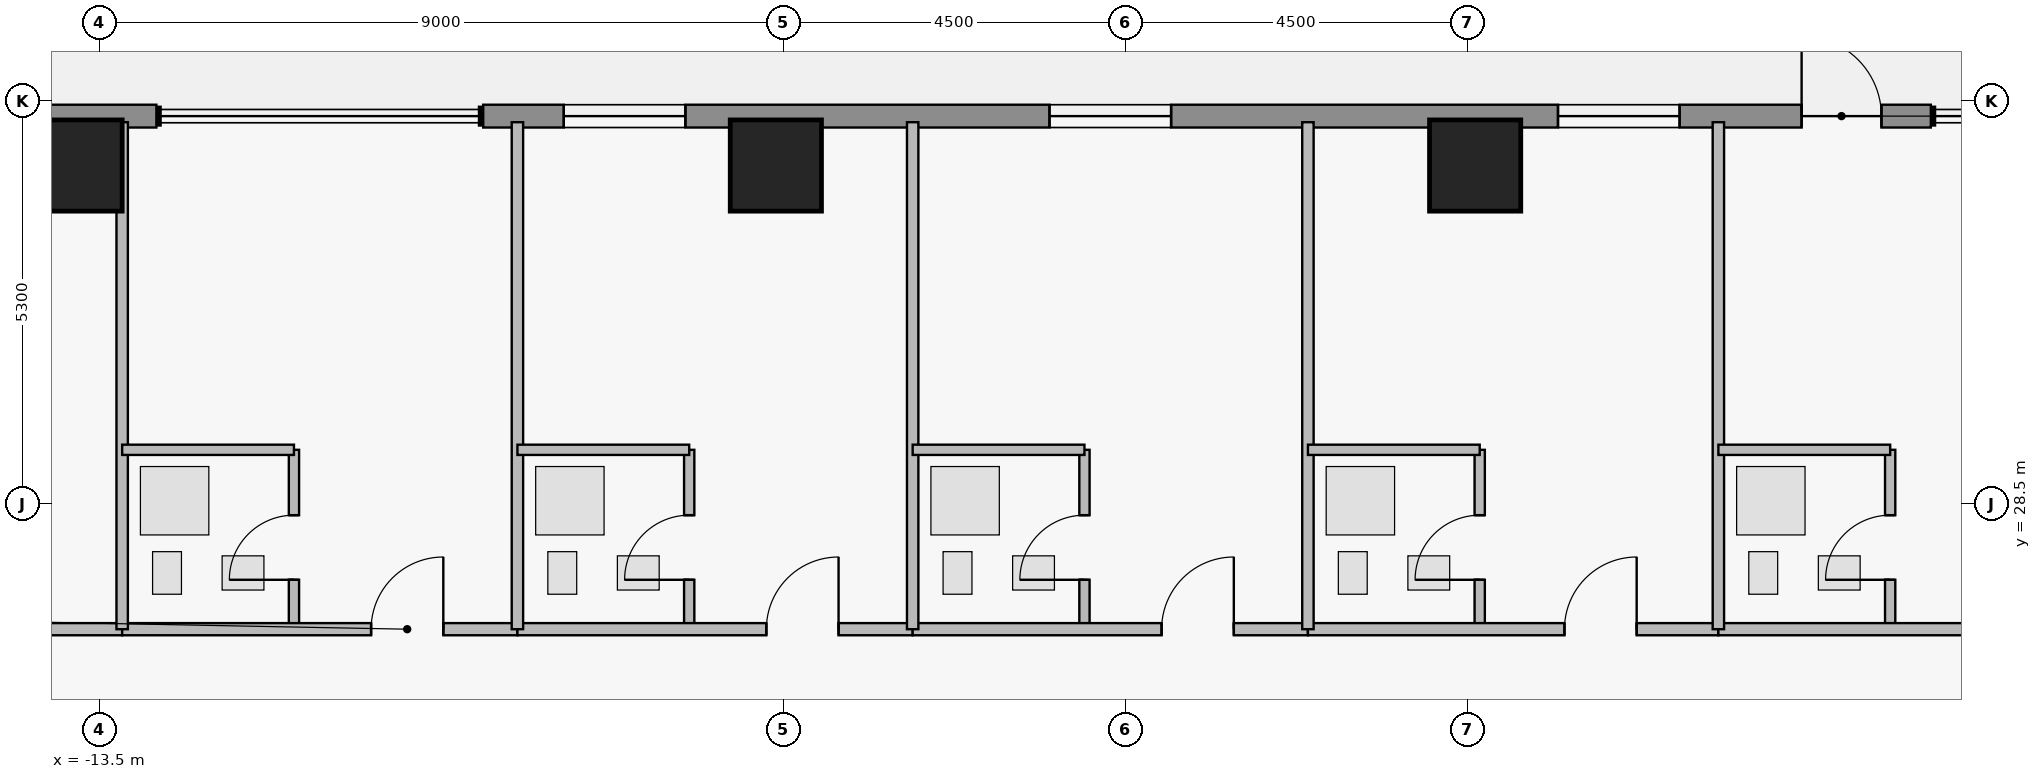
"""IFC4 building model, lengths in metres.
Left out: names, types, materials, properties, quantities, classifications, styles, units other than length and angle.
Written with IfcOpenShell. Run it as: python <this file> out.ifc"""

import sys

from ifc_helpers import new_model, si_unit, direction, frame, frame_2d, origin, origin_2d, place, context, subcontext, project, spatial, rectangle, extrude, element, fill, save


model = new_model("IFC4")
c1 = context("Model", 3, precision=1e-05, world=origin(), true_north=direction((0.0, 1.0)))
c2 = subcontext(c1, "Body", "Model", "MODEL_VIEW")
j1 = project(units=[si_unit("LENGTHUNIT", "METRE"), si_unit("PLANEANGLEUNIT", "RADIAN")], contexts=[c1])
p1 = place(None, origin())
s1 = spatial("IfcSite", under=j1, at=p1, CompositionType="ELEMENT")
p2 = place(p1, origin())
s2 = spatial("IfcBuilding", under=s1, at=p2, CompositionType="ELEMENT")
p3 = place(p2, frame((0.0, 0.0, 199.9)))
s3 = spatial("IfcBuildingStorey", under=s2, at=p3, CompositionType="ELEMENT", Elevation=199.9)
for number, where, z_axis, x_axis in (
    (1, (-13.8, 32.95, 0.0), (0.0, 0.0, 1.0), (1.0, 0.0, 0.0)),
    (2, (-4.6, 32.95, 0.0), (0.0, 0.0, 1.0), (1.0, 0.0, 0.0)),
    (3, (4.6, 32.95, 0.0), (0.0, 0.0, 1.0), (1.0, 0.0, 0.0)),
):
    element("IfcColumn", number, at=place(p3, frame(where, z_axis=z_axis, x_axis=x_axis)), inside=s3, PredefinedType="COLUMN", context=c2, shape_type="SweptSolid", body=[
        extrude(rectangle(XDim=1.2, YDim=1.2, at=origin_2d()), origin(), (0.0, 0.0, 1.0), 3.75),
    ])
p4 = place(p3, frame((-14.72, 33.6, 0.0), z_axis=(0.0, 0.0, 1.0), x_axis=(1.0, 0.0, 0.0)))
e4 = element("IfcWall", 4, at=p4, inside=s3, PredefinedType="STANDARD", context=c2, shape_type="SweptSolid", body=[
    extrude(rectangle(XDim=1.97, YDim=0.3, at=frame_2d((0.985, 0.0))), origin(), (0.0, 0.0, 1.0), 3.53),
])
p5 = place(p3, frame((-8.45, 33.6, 0.0), z_axis=(0.0, 0.0, 1.0), x_axis=(1.0, 0.0, 0.0)))
e5 = element("IfcWall", 5, at=p5, inside=s3, PredefinedType="STANDARD", context=c2, shape_type="SweptSolid", body=[
    extrude(rectangle(XDim=19.045, YDim=0.3, at=frame_2d((9.522, 0.0))), origin(), (0.0, 0.0, 1.0), 3.53),
])
p6 = place(p5, frame((17.345, 0.0, 0.0)))
e6 = element("IfcOpeningElement", 6, at=p6, cuts=e5, PredefinedType="OPENING", context=c2, shape_type="SweptSolid", body=[
    extrude(rectangle(XDim=1.05, YDim=2.2, at=frame_2d((0.525, 1.1))), frame((0.0, 0.16, 0.0), z_axis=(0.0, -1.0, 0.0), x_axis=(1.0, 0.0, 0.0)), (0.0, 0.0, 1.0), 0.32),
])
p7 = place(p5, frame((7.45, 0.0, 0.85)))
e7 = element("IfcOpeningElement", 7, at=p7, cuts=e5, PredefinedType="OPENING", context=c2, shape_type="SweptSolid", body=[
    extrude(rectangle(XDim=1.6, YDim=1.8, at=frame_2d((0.8, 0.9))), frame((0.0, 0.16, 0.0), z_axis=(0.0, -1.0, 0.0), x_axis=(1.0, 0.0, 0.0)), (0.0, 0.0, 1.0), 0.32),
])
p8 = place(p5, frame((1.06, 0.0, 0.85)))
e8 = element("IfcOpeningElement", 8, at=p8, cuts=e5, PredefinedType="OPENING", context=c2, shape_type="SweptSolid", body=[
    extrude(rectangle(XDim=1.6, YDim=1.8, at=frame_2d((0.8, 0.9))), frame((0.0, 0.16, 0.0), z_axis=(0.0, -1.0, 0.0), x_axis=(1.0, 0.0, 0.0)), (0.0, 0.0, 1.0), 0.32),
])
p9 = place(p5, frame((14.14, 0.0, 0.85)))
e9 = element("IfcOpeningElement", 9, at=p9, cuts=e5, PredefinedType="OPENING", context=c2, shape_type="SweptSolid", body=[
    extrude(rectangle(XDim=1.6, YDim=1.8, at=frame_2d((0.8, 0.9))), frame((0.0, 0.16, 0.0), z_axis=(0.0, -1.0, 0.0), x_axis=(1.0, 0.0, 0.0)), (0.0, 0.0, 1.0), 0.32),
])
p10 = place(p3, frame((-22.04, 26.85, 0.0), z_axis=(0.0, 0.0, 1.0), x_axis=(1.0, 0.0, 0.0)))
e10 = element("IfcWall", 10, at=p10, inside=s3, PredefinedType="PARTITIONING", context=c2, shape_type="SweptSolid", body=[
    extrude(rectangle(XDim=8.84, YDim=0.16, at=frame_2d((4.42, 0.0))), origin(), (0.0, 0.0, 1.0), 3.53),
])
p11 = place(p10, frame((5.07, 0.0, 0.0)))
e11 = element("IfcOpeningElement", 11, at=p11, cuts=e10, PredefinedType="OPENING", context=c2, shape_type="SweptSolid", body=[
    extrude(rectangle(XDim=1.0, YDim=2.15, at=frame_2d((0.5, 1.075))), frame((0.0, 0.09, 0.0), z_axis=(0.0, -1.0, 0.0), x_axis=(1.0, 0.0, 0.0)), (0.0, 0.0, 1.0), 0.18),
])
p12 = place(p3, frame((-10.94, 26.85, 0.0), z_axis=(0.0, 0.0, 1.0), x_axis=(0.0, 1.0, 0.0)))
e12 = element("IfcWall", 12, at=p12, inside=s3, PredefinedType="PLUMBINGWALL", context=c2, shape_type="SweptSolid", body=[
    extrude(rectangle(XDim=2.36, YDim=0.135, at=frame_2d((1.18, 0.0))), origin(), (0.0, 0.0, 1.0), 3.53),
])
p13 = place(p12, frame((0.65, 0.0, 0.0)))
e13 = element("IfcOpeningElement", 13, at=p13, cuts=e12, PredefinedType="OPENING", context=c2, shape_type="SweptSolid", body=[
    extrude(rectangle(XDim=0.85, YDim=2.1, at=frame_2d((0.425, 1.05))), frame((0.0, 0.077, 0.0), z_axis=(0.0, -1.0, 0.0), x_axis=(1.0, 0.0, 0.0)), (0.0, 0.0, 1.0), 0.155),
])
p14 = place(p3, frame((-13.2, 26.85, 0.0), z_axis=(0.0, 0.0, 1.0), x_axis=(1.0, 0.0, 0.0)))
e14 = element("IfcWall", 14, at=p14, inside=s3, PredefinedType="PARTITIONING", context=c2, shape_type="SweptSolid", body=[
    extrude(rectangle(XDim=5.2, YDim=0.16, at=frame_2d((2.6, 0.0))), origin(), (0.0, 0.0, 1.0), 3.53),
])
p15 = place(p14, frame((3.275, 0.0, 0.0)))
e15 = element("IfcOpeningElement", 15, at=p15, cuts=e14, PredefinedType="OPENING", context=c2, shape_type="SweptSolid", body=[
    extrude(rectangle(XDim=0.95, YDim=2.15, at=frame_2d((0.475, 1.075))), frame((0.0, 0.09, 0.0), z_axis=(0.0, -1.0, 0.0), x_axis=(1.0, 0.0, 0.0)), (0.0, 0.0, 1.0), 0.18),
])
p16 = place(p3, frame((-5.74, 26.85, 0.0), z_axis=(0.0, 0.0, 1.0), x_axis=(0.0, 1.0, 0.0)))
e16 = element("IfcWall", 16, at=p16, inside=s3, PredefinedType="PLUMBINGWALL", context=c2, shape_type="SweptSolid", body=[
    extrude(rectangle(XDim=2.36, YDim=0.135, at=frame_2d((1.18, 0.0))), origin(), (0.0, 0.0, 1.0), 3.53),
])
p17 = place(p16, frame((0.65, 0.0, 0.0)))
e17 = element("IfcOpeningElement", 17, at=p17, cuts=e16, PredefinedType="OPENING", context=c2, shape_type="SweptSolid", body=[
    extrude(rectangle(XDim=0.85, YDim=2.1, at=frame_2d((0.425, 1.05))), frame((0.0, 0.077, 0.0), z_axis=(0.0, -1.0, 0.0), x_axis=(1.0, 0.0, 0.0)), (0.0, 0.0, 1.0), 0.155),
])
p18 = place(p3, frame((-8.0, 26.85, 0.0), z_axis=(0.0, 0.0, 1.0), x_axis=(1.0, 0.0, 0.0)))
e18 = element("IfcWall", 18, at=p18, inside=s3, PredefinedType="PARTITIONING", context=c2, shape_type="SweptSolid", body=[
    extrude(rectangle(XDim=5.2, YDim=0.16, at=frame_2d((2.6, 0.0))), origin(), (0.0, 0.0, 1.0), 3.53),
])
p19 = place(p18, frame((3.275, 0.0, 0.0)))
e19 = element("IfcOpeningElement", 19, at=p19, cuts=e18, PredefinedType="OPENING", context=c2, shape_type="SweptSolid", body=[
    extrude(rectangle(XDim=0.95, YDim=2.15, at=frame_2d((0.475, 1.075))), frame((0.0, 0.09, 0.0), z_axis=(0.0, -1.0, 0.0), x_axis=(1.0, 0.0, 0.0)), (0.0, 0.0, 1.0), 0.18),
])
p20 = place(p3, frame((-0.54, 26.85, 0.0), z_axis=(0.0, 0.0, 1.0), x_axis=(0.0, 1.0, 0.0)))
e20 = element("IfcWall", 20, at=p20, inside=s3, PredefinedType="PLUMBINGWALL", context=c2, shape_type="SweptSolid", body=[
    extrude(rectangle(XDim=2.36, YDim=0.135, at=frame_2d((1.18, 0.0))), origin(), (0.0, 0.0, 1.0), 3.53),
])
p21 = place(p20, frame((0.65, 0.0, 0.0)))
e21 = element("IfcOpeningElement", 21, at=p21, cuts=e20, PredefinedType="OPENING", context=c2, shape_type="SweptSolid", body=[
    extrude(rectangle(XDim=0.85, YDim=2.1, at=frame_2d((0.425, 1.05))), frame((0.0, 0.077, 0.0), z_axis=(0.0, -1.0, 0.0), x_axis=(1.0, 0.0, 0.0)), (0.0, 0.0, 1.0), 0.155),
])
p22 = place(p3, frame((-2.8, 26.85, 0.0), z_axis=(0.0, 0.0, 1.0), x_axis=(1.0, 0.0, 0.0)))
e22 = element("IfcWall", 22, at=p22, inside=s3, PredefinedType="PARTITIONING", context=c2, shape_type="SweptSolid", body=[
    extrude(rectangle(XDim=5.2, YDim=0.16, at=frame_2d((2.6, 0.0))), origin(), (0.0, 0.0, 1.0), 3.53),
])
p23 = place(p22, frame((3.275, 0.0, 0.0)))
e23 = element("IfcOpeningElement", 23, at=p23, cuts=e22, PredefinedType="OPENING", context=c2, shape_type="SweptSolid", body=[
    extrude(rectangle(XDim=0.95, YDim=2.15, at=frame_2d((0.475, 1.075))), frame((0.0, 0.09, 0.0), z_axis=(0.0, -1.0, 0.0), x_axis=(1.0, 0.0, 0.0)), (0.0, 0.0, 1.0), 0.18),
])
p24 = place(p3, frame((4.66, 26.85, 0.0), z_axis=(0.0, 0.0, 1.0), x_axis=(0.0, 1.0, 0.0)))
e24 = element("IfcWall", 24, at=p24, inside=s3, PredefinedType="PLUMBINGWALL", context=c2, shape_type="SweptSolid", body=[
    extrude(rectangle(XDim=2.36, YDim=0.135, at=frame_2d((1.18, 0.0))), origin(), (0.0, 0.0, 1.0), 2.519),
])
p25 = place(p24, frame((0.65, 0.0, 0.0)))
e25 = element("IfcOpeningElement", 25, at=p25, cuts=e24, PredefinedType="OPENING", context=c2, shape_type="SweptSolid", body=[
    extrude(rectangle(XDim=0.85, YDim=2.1, at=frame_2d((0.425, 1.05))), frame((0.0, 0.077, 0.0), z_axis=(0.0, -1.0, 0.0), x_axis=(1.0, 0.0, 0.0)), (0.0, 0.0, 1.0), 0.155),
])
p26 = place(p3, frame((2.4, 26.85, 0.0), z_axis=(0.0, 0.0, 1.0), x_axis=(1.0, 0.0, 0.0)))
e26 = element("IfcWall", 26, at=p26, inside=s3, PredefinedType="PARTITIONING", context=c2, shape_type="SweptSolid", body=[
    extrude(rectangle(XDim=5.4, YDim=0.16, at=frame_2d((2.7, 0.0))), origin(), (0.0, 0.0, 1.0), 3.53),
])
p27 = place(p26, frame((3.375, 0.0, 0.0)))
e27 = element("IfcOpeningElement", 27, at=p27, cuts=e26, PredefinedType="OPENING", context=c2, shape_type="SweptSolid", body=[
    extrude(rectangle(XDim=0.95, YDim=2.15, at=frame_2d((0.475, 1.075))), frame((0.0, 0.09, 0.0), z_axis=(0.0, -1.0, 0.0), x_axis=(1.0, 0.0, 0.0)), (0.0, 0.0, 1.0), 0.18),
])
p28 = place(p3, frame((10.06, 26.85, 0.0), z_axis=(0.0, 0.0, 1.0), x_axis=(0.0, 1.0, 0.0)))
e28 = element("IfcWall", 28, at=p28, inside=s3, PredefinedType="PLUMBINGWALL", context=c2, shape_type="SweptSolid", body=[
    extrude(rectangle(XDim=2.36, YDim=0.135, at=frame_2d((1.18, 0.0))), origin(), (0.0, 0.0, 1.0), 3.53),
])
p29 = place(p28, frame((0.65, 0.0, 0.0)))
e29 = element("IfcOpeningElement", 29, at=p29, cuts=e28, PredefinedType="OPENING", context=c2, shape_type="SweptSolid", body=[
    extrude(rectangle(XDim=0.85, YDim=2.1, at=frame_2d((0.425, 1.05))), frame((0.0, 0.077, 0.0), z_axis=(0.0, -1.0, 0.0), x_axis=(1.0, 0.0, 0.0)), (0.0, 0.0, 1.0), 0.155),
])
p30 = place(p3, frame((7.8, 26.85, 0.0), z_axis=(0.0, 0.0, 1.0), x_axis=(1.0, 0.0, 0.0)))
e30 = element("IfcWall", 30, at=p30, inside=s3, PredefinedType="PARTITIONING", context=c2, shape_type="SweptSolid", body=[
    extrude(rectangle(XDim=5.4, YDim=0.16, at=frame_2d((2.7, 0.0))), origin(), (0.0, 0.0, 1.0), 3.53),
])
p31 = place(p30, frame((3.375, 0.0, 0.0)))
e31 = element("IfcOpeningElement", 31, at=p31, cuts=e30, PredefinedType="OPENING", context=c2, shape_type="SweptSolid", body=[
    extrude(rectangle(XDim=0.95, YDim=2.15, at=frame_2d((0.475, 1.075))), frame((0.0, 0.09, 0.0), z_axis=(0.0, -1.0, 0.0), x_axis=(1.0, 0.0, 0.0)), (0.0, 0.0, 1.0), 0.18),
])
p32 = place(p3, frame((-13.2, 26.85, 0.0), z_axis=(0.0, 0.0, 1.0), x_axis=(0.0, 1.0, 0.0)))
e32 = element("IfcWall", 32, at=p32, inside=s3, PredefinedType="PARTITIONING", context=c2, shape_type="SweptSolid", body=[
    extrude(rectangle(XDim=6.67, YDim=0.15, at=frame_2d((3.335, 0.0))), origin(), (0.0, 0.0, 1.0), 3.53),
])
p33 = place(p3, frame((-13.2, 29.21, 0.0), z_axis=(0.0, 0.0, 1.0), x_axis=(1.0, 0.0, 0.0)))
e33 = element("IfcWall", 33, at=p33, inside=s3, PredefinedType="PLUMBINGWALL", context=c2, shape_type="SweptSolid", body=[
    extrude(rectangle(XDim=2.26, YDim=0.135, at=frame_2d((1.13, 0.0))), origin(), (0.0, 0.0, 1.0), 3.53),
])
p34 = place(p3, frame((-8.0, 26.85, 0.0), z_axis=(0.0, 0.0, 1.0), x_axis=(0.0, 1.0, 0.0)))
e34 = element("IfcWall", 34, at=p34, inside=s3, PredefinedType="PARTITIONING", context=c2, shape_type="SweptSolid", body=[
    extrude(rectangle(XDim=6.67, YDim=0.15, at=frame_2d((3.335, 0.0))), origin(), (0.0, 0.0, 1.0), 3.53),
])
p35 = place(p3, frame((-8.0, 29.21, 0.0), z_axis=(0.0, 0.0, 1.0), x_axis=(1.0, 0.0, 0.0)))
e35 = element("IfcWall", 35, at=p35, inside=s3, PredefinedType="PLUMBINGWALL", context=c2, shape_type="SweptSolid", body=[
    extrude(rectangle(XDim=2.26, YDim=0.135, at=frame_2d((1.13, 0.0))), origin(), (0.0, 0.0, 1.0), 3.53),
])
p36 = place(p3, frame((-2.8, 26.85, 0.0), z_axis=(0.0, 0.0, 1.0), x_axis=(0.0, 1.0, 0.0)))
e36 = element("IfcWall", 36, at=p36, inside=s3, PredefinedType="PARTITIONING", context=c2, shape_type="SweptSolid", body=[
    extrude(rectangle(XDim=6.67, YDim=0.15, at=frame_2d((3.335, 0.0))), origin(), (0.0, 0.0, 1.0), 3.53),
])
p37 = place(p3, frame((-2.8, 29.21, 0.0), z_axis=(0.0, 0.0, 1.0), x_axis=(1.0, 0.0, 0.0)))
e37 = element("IfcWall", 37, at=p37, inside=s3, PredefinedType="PLUMBINGWALL", context=c2, shape_type="SweptSolid", body=[
    extrude(rectangle(XDim=2.26, YDim=0.135, at=frame_2d((1.13, 0.0))), origin(), (0.0, 0.0, 1.0), 3.53),
])
p38 = place(p3, frame((2.4, 26.85, 0.0), z_axis=(0.0, 0.0, 1.0), x_axis=(0.0, 1.0, 0.0)))
e38 = element("IfcWall", 38, at=p38, inside=s3, PredefinedType="PARTITIONING", context=c2, shape_type="SweptSolid", body=[
    extrude(rectangle(XDim=6.67, YDim=0.15, at=frame_2d((3.335, 0.0))), origin(), (0.0, 0.0, 1.0), 3.53),
])
p39 = place(p3, frame((2.4, 29.21, 0.0), z_axis=(0.0, 0.0, 1.0), x_axis=(1.0, 0.0, 0.0)))
e39 = element("IfcWall", 39, at=p39, inside=s3, PredefinedType="PLUMBINGWALL", context=c2, shape_type="SweptSolid", body=[
    extrude(rectangle(XDim=2.26, YDim=0.135, at=frame_2d((1.13, 0.0))), origin(), (0.0, 0.0, 1.0), 3.53),
])
p40 = place(p3, frame((7.8, 26.85, 0.0), z_axis=(0.0, 0.0, 1.0), x_axis=(0.0, 1.0, 0.0)))
e40 = element("IfcWall", 40, at=p40, inside=s3, PredefinedType="PARTITIONING", context=c2, shape_type="SweptSolid", body=[
    extrude(rectangle(XDim=6.67, YDim=0.15, at=frame_2d((3.335, 0.0))), origin(), (0.0, 0.0, 1.0), 3.53),
])
p41 = place(p3, frame((7.8, 29.21, 0.0), z_axis=(0.0, 0.0, 1.0), x_axis=(1.0, 0.0, 0.0)))
e41 = element("IfcWall", 41, at=p41, inside=s3, PredefinedType="PLUMBINGWALL", context=c2, shape_type="SweptSolid", body=[
    extrude(rectangle(XDim=2.26, YDim=0.135, at=frame_2d((1.13, 0.0))), origin(), (0.0, 0.0, 1.0), 3.53),
])
p42 = place(p6, origin())
e42 = element("IfcDoor", 42, at=p42, inside=s3, OperationType="SINGLE_SWING_LEFT", PredefinedType="DOOR", context=c2, shape_type="SweptSolid", body=[
    extrude(rectangle(XDim=1.05, YDim=2.2, at=frame_2d((0.525, 1.1))), frame((0.0, 0.025, 0.0), z_axis=(0.0, -1.0, 0.0), x_axis=(1.0, 0.0, 0.0)), (0.0, 0.0, 1.0), 0.05),
])
fill(e6, e42)
p43 = place(p7, origin())
e43 = element("IfcWindow", 43, at=p43, inside=s3, PartitioningType="SINGLE_PANEL", PredefinedType="WINDOW", context=c2, shape_type="SweptSolid", body=[
    extrude(rectangle(XDim=1.6, YDim=1.8, at=frame_2d((0.8, 0.9))), frame((0.0, 0.03, 0.0), z_axis=(0.0, -1.0, 0.0), x_axis=(1.0, 0.0, 0.0)), (0.0, 0.0, 1.0), 0.06),
])
fill(e7, e43)
p44 = place(p8, origin())
e44 = element("IfcWindow", 44, at=p44, inside=s3, PartitioningType="SINGLE_PANEL", PredefinedType="WINDOW", context=c2, shape_type="SweptSolid", body=[
    extrude(rectangle(XDim=1.6, YDim=1.8, at=frame_2d((0.8, 0.9))), frame((0.0, 0.03, 0.0), z_axis=(0.0, -1.0, 0.0), x_axis=(1.0, 0.0, 0.0)), (0.0, 0.0, 1.0), 0.06),
])
fill(e8, e44)
p45 = place(p9, origin())
e45 = element("IfcWindow", 45, at=p45, inside=s3, PartitioningType="SINGLE_PANEL", PredefinedType="WINDOW", context=c2, shape_type="SweptSolid", body=[
    extrude(rectangle(XDim=1.6, YDim=1.8, at=frame_2d((0.8, 0.9))), frame((0.0, 0.03, 0.0), z_axis=(0.0, -1.0, 0.0), x_axis=(1.0, 0.0, 0.0)), (0.0, 0.0, 1.0), 0.06),
])
fill(e9, e45)
p46 = place(p13, origin())
e46 = element("IfcDoor", 46, at=p46, inside=s3, OperationType="SINGLE_SWING_LEFT", PredefinedType="DOOR", context=c2, shape_type="SweptSolid", body=[
    extrude(rectangle(XDim=0.85, YDim=2.1, at=frame_2d((0.425, 1.05))), frame((0.0, 0.025, 0.0), z_axis=(0.0, -1.0, 0.0), x_axis=(1.0, 0.0, 0.0)), (0.0, 0.0, 1.0), 0.05),
])
fill(e13, e46)
p47 = place(p15, origin())
e47 = element("IfcDoor", 47, at=p47, inside=s3, OperationType="SINGLE_SWING_RIGHT", PredefinedType="DOOR", context=c2, shape_type="SweptSolid", body=[
    extrude(rectangle(XDim=0.95, YDim=2.15, at=frame_2d((0.475, 1.075))), frame((0.0, 0.025, 0.0), z_axis=(0.0, -1.0, 0.0), x_axis=(1.0, 0.0, 0.0)), (0.0, 0.0, 1.0), 0.05),
])
fill(e15, e47)
p48 = place(p17, origin())
e48 = element("IfcDoor", 48, at=p48, inside=s3, OperationType="SINGLE_SWING_LEFT", PredefinedType="DOOR", context=c2, shape_type="SweptSolid", body=[
    extrude(rectangle(XDim=0.85, YDim=2.1, at=frame_2d((0.425, 1.05))), frame((0.0, 0.025, 0.0), z_axis=(0.0, -1.0, 0.0), x_axis=(1.0, 0.0, 0.0)), (0.0, 0.0, 1.0), 0.05),
])
fill(e17, e48)
p49 = place(p19, origin())
e49 = element("IfcDoor", 49, at=p49, inside=s3, OperationType="SINGLE_SWING_RIGHT", PredefinedType="DOOR", context=c2, shape_type="SweptSolid", body=[
    extrude(rectangle(XDim=0.95, YDim=2.15, at=frame_2d((0.475, 1.075))), frame((0.0, 0.025, 0.0), z_axis=(0.0, -1.0, 0.0), x_axis=(1.0, 0.0, 0.0)), (0.0, 0.0, 1.0), 0.05),
])
fill(e19, e49)
p50 = place(p21, origin())
e50 = element("IfcDoor", 50, at=p50, inside=s3, OperationType="SINGLE_SWING_LEFT", PredefinedType="DOOR", context=c2, shape_type="SweptSolid", body=[
    extrude(rectangle(XDim=0.85, YDim=2.1, at=frame_2d((0.425, 1.05))), frame((0.0, 0.025, 0.0), z_axis=(0.0, -1.0, 0.0), x_axis=(1.0, 0.0, 0.0)), (0.0, 0.0, 1.0), 0.05),
])
fill(e21, e50)
p51 = place(p23, origin())
e51 = element("IfcDoor", 51, at=p51, inside=s3, OperationType="SINGLE_SWING_RIGHT", PredefinedType="DOOR", context=c2, shape_type="SweptSolid", body=[
    extrude(rectangle(XDim=0.95, YDim=2.15, at=frame_2d((0.475, 1.075))), frame((0.0, 0.025, 0.0), z_axis=(0.0, -1.0, 0.0), x_axis=(1.0, 0.0, 0.0)), (0.0, 0.0, 1.0), 0.05),
])
fill(e23, e51)
p52 = place(p25, origin())
e52 = element("IfcDoor", 52, at=p52, inside=s3, OperationType="SINGLE_SWING_LEFT", PredefinedType="DOOR", context=c2, shape_type="SweptSolid", body=[
    extrude(rectangle(XDim=0.85, YDim=2.1, at=frame_2d((0.425, 1.05))), frame((0.0, 0.025, 0.0), z_axis=(0.0, -1.0, 0.0), x_axis=(1.0, 0.0, 0.0)), (0.0, 0.0, 1.0), 0.05),
])
fill(e25, e52)
p53 = place(p27, origin())
e53 = element("IfcDoor", 53, at=p53, inside=s3, OperationType="SINGLE_SWING_RIGHT", PredefinedType="DOOR", context=c2, shape_type="SweptSolid", body=[
    extrude(rectangle(XDim=0.95, YDim=2.15, at=frame_2d((0.475, 1.075))), frame((0.0, 0.025, 0.0), z_axis=(0.0, -1.0, 0.0), x_axis=(1.0, 0.0, 0.0)), (0.0, 0.0, 1.0), 0.05),
])
fill(e27, e53)
p54 = place(p29, origin())
e54 = element("IfcDoor", 54, at=p54, inside=s3, OperationType="SINGLE_SWING_LEFT", PredefinedType="DOOR", context=c2, shape_type="SweptSolid", body=[
    extrude(rectangle(XDim=0.85, YDim=2.1, at=frame_2d((0.425, 1.05))), frame((0.0, 0.025, 0.0), z_axis=(0.0, -1.0, 0.0), x_axis=(1.0, 0.0, 0.0)), (0.0, 0.0, 1.0), 0.05),
])
fill(e29, e54)
save(model, sys.argv[1])
